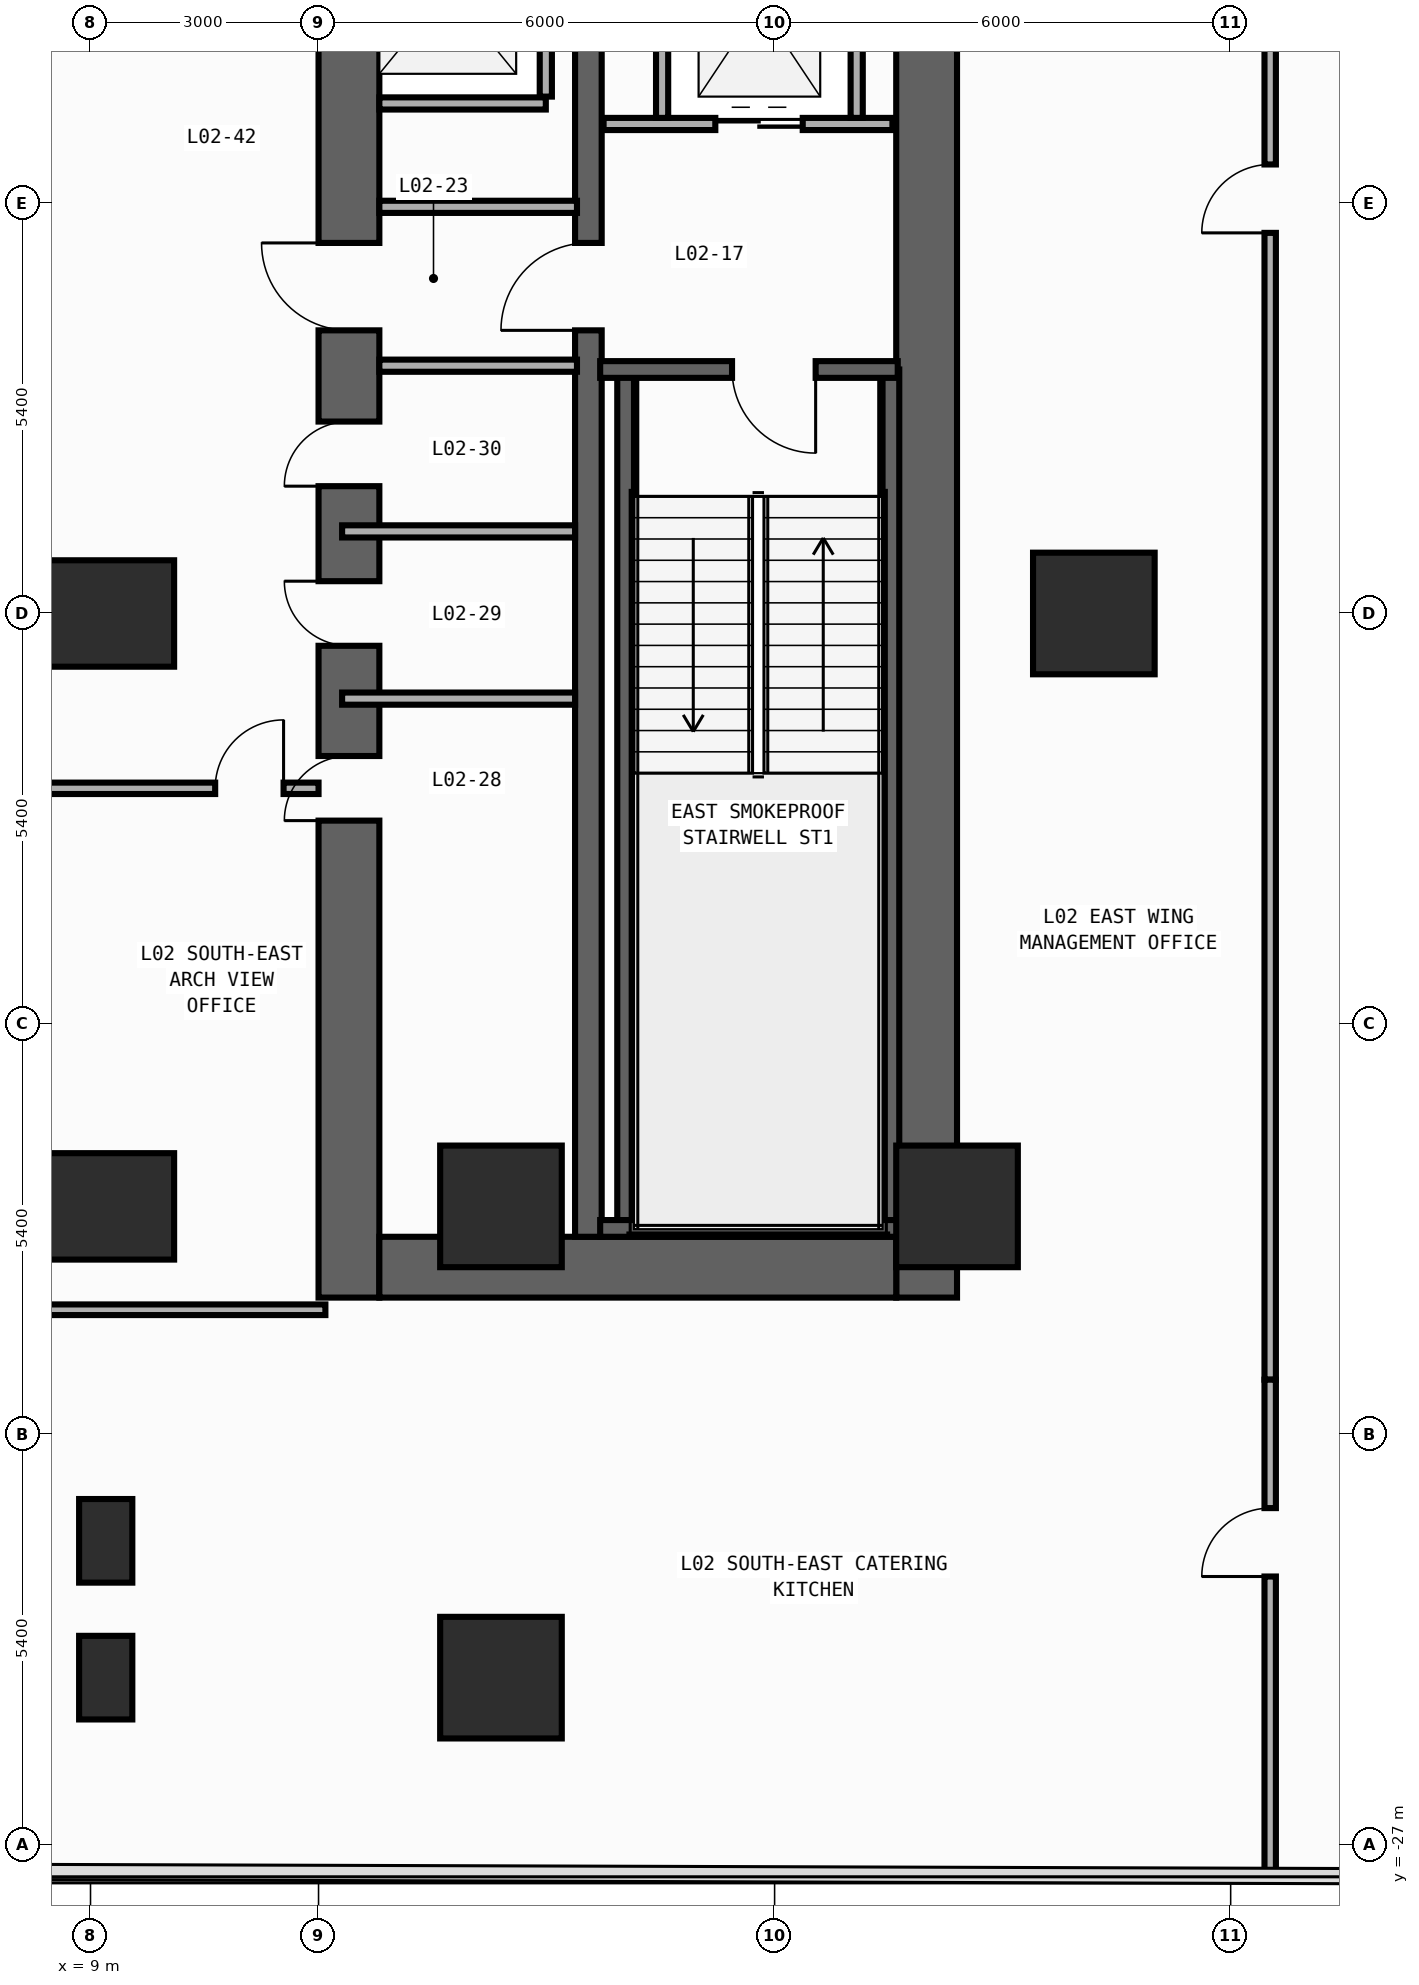
"""IFC4 building model, lengths in metres.
Left out: names, types, materials, properties, quantities, classifications, styles, units other than length and angle.
Written with IfcOpenShell. Run it as: python <this file> out.ifc"""

import sys

from ifc_helpers import new_model, si_unit, direction, frame, frame_2d, origin, origin_2d, place, context, subcontext, project, spatial, rectangle, extrude, element, fill, save


model = new_model("IFC4")
c1 = context("Model", 3, precision=1e-05, world=origin(), true_north=direction((0.0, 1.0)))
c2 = subcontext(c1, "Body", "Model", "MODEL_VIEW")
j1 = project(units=[si_unit("LENGTHUNIT", "METRE"), si_unit("PLANEANGLEUNIT", "RADIAN")], contexts=[c1])
p1 = place(None, origin())
s1 = spatial("IfcSite", under=j1, at=p1, CompositionType="ELEMENT")
p2 = place(p1, origin())
s2 = spatial("IfcBuilding", under=s1, at=p2, CompositionType="ELEMENT")
p3 = place(p2, frame((0.0, 0.0, 6.0)))
s3 = spatial("IfcBuildingStorey", under=s2, at=p3, CompositionType="ELEMENT", Elevation=6.0)
p4 = place(p3, frame((12.4, -19.8, 0.0), z_axis=(0.0, 0.0, 1.0), x_axis=(0.0, 1.0, 0.0)))
e1 = element("IfcWall", 1, at=p4, inside=s3, PredefinedType="SHEAR", context=c2, shape_type="SweptSolid", body=[
    extrude(rectangle(XDim=27.0, YDim=0.8, at=frame_2d((13.5, 0.0))), origin(), (0.0, 0.0, 1.0), 4.7),
])
p5 = place(p4, frame((23.05, 0.0, 0.0)))
e2 = element("IfcOpeningElement", 2, at=p5, cuts=e1, PredefinedType="OPENING", context=c2, shape_type="SweptSolid", body=[
    extrude(rectangle(XDim=1.1, YDim=2.2, at=frame_2d((0.55, 1.1))), frame((0.0, 0.41, 0.0), z_axis=(0.0, -1.0, 0.0), x_axis=(1.0, 0.0, 0.0)), (0.0, 0.0, 1.0), 0.82),
])
p6 = place(p4, frame((19.85, 0.0, 0.0)))
e3 = element("IfcOpeningElement", 3, at=p6, cuts=e1, PredefinedType="OPENING", context=c2, shape_type="SweptSolid", body=[
    extrude(rectangle(XDim=1.1, YDim=2.2, at=frame_2d((0.55, 1.1))), frame((0.0, 0.41, 0.0), z_axis=(0.0, -1.0, 0.0), x_axis=(1.0, 0.0, 0.0)), (0.0, 0.0, 1.0), 0.82),
])
p7 = place(p4, frame((16.65, 0.0, 0.0)))
e4 = element("IfcOpeningElement", 4, at=p7, cuts=e1, PredefinedType="OPENING", context=c2, shape_type="SweptSolid", body=[
    extrude(rectangle(XDim=1.1, YDim=2.2, at=frame_2d((0.55, 1.1))), frame((0.0, 0.41, 0.0), z_axis=(0.0, -1.0, 0.0), x_axis=(1.0, 0.0, 0.0)), (0.0, 0.0, 1.0), 0.82),
])
p8 = place(p4, frame((6.275, 0.0, 0.0)))
e5 = element("IfcOpeningElement", 5, at=p8, cuts=e1, PredefinedType="OPENING", context=c2, shape_type="SweptSolid", body=[
    extrude(rectangle(XDim=0.85, YDim=2.1, at=frame_2d((0.425, 1.05))), frame((0.0, 0.41, 0.0), z_axis=(0.0, -1.0, 0.0), x_axis=(1.0, 0.0, 0.0)), (0.0, 0.0, 1.0), 0.82),
])
p9 = place(p4, frame((8.575, 0.0, 0.0)))
e6 = element("IfcOpeningElement", 6, at=p9, cuts=e1, PredefinedType="OPENING", context=c2, shape_type="SweptSolid", body=[
    extrude(rectangle(XDim=0.85, YDim=2.1, at=frame_2d((0.425, 1.05))), frame((0.0, 0.41, 0.0), z_axis=(0.0, -1.0, 0.0), x_axis=(1.0, 0.0, 0.0)), (0.0, 0.0, 1.0), 0.82),
])
p10 = place(p4, frame((10.675, 0.0, 0.0)))
e7 = element("IfcOpeningElement", 7, at=p10, cuts=e1, PredefinedType="OPENING", context=c2, shape_type="SweptSolid", body=[
    extrude(rectangle(XDim=0.85, YDim=2.1, at=frame_2d((0.425, 1.05))), frame((0.0, 0.41, 0.0), z_axis=(0.0, -1.0, 0.0), x_axis=(1.0, 0.0, 0.0)), (0.0, 0.0, 1.0), 0.82),
])
p11 = place(p4, frame((12.725, 0.0, 0.0)))
e8 = element("IfcOpeningElement", 8, at=p11, cuts=e1, PredefinedType="OPENING", context=c2, shape_type="SweptSolid", body=[
    extrude(rectangle(XDim=1.15, YDim=2.2, at=frame_2d((0.575, 1.1))), frame((0.0, 0.41, 0.0), z_axis=(0.0, -1.0, 0.0), x_axis=(1.0, 0.0, 0.0)), (0.0, 0.0, 1.0), 0.82),
])
p12 = place(p4, frame((25.125, 0.0, 0.0)))
e9 = element("IfcOpeningElement", 9, at=p12, cuts=e1, PredefinedType="OPENING", context=c2, shape_type="SweptSolid", body=[
    extrude(rectangle(XDim=0.85, YDim=2.1, at=frame_2d((0.425, 1.05))), frame((0.0, 0.41, 0.0), z_axis=(0.0, -1.0, 0.0), x_axis=(1.0, 0.0, 0.0)), (0.0, 0.0, 1.0), 0.82),
])
p13 = place(p3, frame((20.0, -19.8, 0.0), z_axis=(0.0, 0.0, 1.0), x_axis=(0.0, 1.0, 0.0)))
e10 = element("IfcWall", 10, at=p13, inside=s3, PredefinedType="SHEAR", context=c2, shape_type="SweptSolid", body=[
    extrude(rectangle(XDim=27.0, YDim=0.8, at=frame_2d((13.5, 0.0))), origin(), (0.0, 0.0, 1.0), 4.7),
])
p14 = place(p3, frame((12.8, -19.4, 0.0), z_axis=(0.0, 0.0, 1.0), x_axis=(1.0, 0.0, 0.0)))
e11 = element("IfcWall", 11, at=p14, inside=s3, PredefinedType="SHEAR", context=c2, shape_type="SweptSolid", body=[
    extrude(rectangle(XDim=6.8, YDim=0.8, at=frame_2d((3.4, 0.0))), origin(), (0.0, 0.0, 1.0), 4.7),
])
p15 = place(p3, frame((15.55, -19.0, 0.0), z_axis=(0.0, 0.0, 1.0), x_axis=(0.0, 1.0, 0.0)))
e12 = element("IfcWall", 12, at=p15, inside=s3, PredefinedType="SHEAR", context=c2, shape_type="SweptSolid", body=[
    extrude(rectangle(XDim=25.4, YDim=0.35, at=frame_2d((12.7, 0.0))), origin(), (0.0, 0.0, 1.0), 4.7),
])
p16 = place(p15, frame((11.925, 0.0, 0.0)))
e13 = element("IfcOpeningElement", 13, at=p16, cuts=e12, PredefinedType="OPENING", context=c2, shape_type="SweptSolid", body=[
    extrude(rectangle(XDim=1.15, YDim=2.2, at=frame_2d((0.575, 1.1))), frame((0.0, 0.185, 0.0), z_axis=(0.0, -1.0, 0.0), x_axis=(1.0, 0.0, 0.0)), (0.0, 0.0, 1.0), 0.37),
])
p17 = place(p15, frame((24.325, 0.0, 0.0)))
e14 = element("IfcOpeningElement", 14, at=p17, cuts=e12, PredefinedType="OPENING", context=c2, shape_type="SweptSolid", body=[
    extrude(rectangle(XDim=0.85, YDim=2.1, at=frame_2d((0.425, 1.05))), frame((0.0, 0.185, 0.0), z_axis=(0.0, -1.0, 0.0), x_axis=(1.0, 0.0, 0.0)), (0.0, 0.0, 1.0), 0.37),
])
for number, where, z_axis, x_axis in (
    (15, (16.04, -18.89, 0.0), (0.0, 0.0, 1.0), (0.0, 1.0, 0.0)),
    (16, (19.53, -18.89, 0.0), (0.0, 0.0, 1.0), (0.0, 1.0, 0.0)),
):
    element("IfcWall", number, at=place(p3, frame(where, z_axis=z_axis, x_axis=x_axis)), inside=s3, PredefinedType="SHEAR", context=c2, shape_type="SweptSolid", body=[
        extrude(rectangle(XDim=11.3, YDim=0.22, at=frame_2d((5.65, 0.0))), origin(), (0.0, 0.0, 1.0), 4.7),
    ])
p18 = place(p3, frame((15.705, -18.89, 0.0), z_axis=(0.0, 0.0, 1.0), x_axis=(1.0, 0.0, 0.0)))
e17 = element("IfcWall", 17, at=p18, inside=s3, PredefinedType="SHEAR", context=c2, shape_type="SweptSolid", body=[
    extrude(rectangle(XDim=3.915, YDim=0.22, at=frame_2d((1.958, 0.0))), origin(), (0.0, 0.0, 1.0), 4.7),
])
p19 = place(p3, frame((19.62, -7.59, 0.0), z_axis=(0.0, 0.0, 1.0), x_axis=(-1.0, 0.0, 0.0)))
e18 = element("IfcWall", 18, at=p19, inside=s3, PredefinedType="SHEAR", context=c2, shape_type="SweptSolid", body=[
    extrude(rectangle(XDim=3.915, YDim=0.22, at=frame_2d((1.958, 0.0))), origin(), (0.0, 0.0, 1.0), 4.7),
])
p20 = place(p19, frame((1.08, 0.0, 0.0)))
e19 = element("IfcOpeningElement", 19, at=p20, cuts=e18, PredefinedType="OPENING", context=c2, shape_type="SweptSolid", body=[
    extrude(rectangle(XDim=1.1, YDim=2.2, at=frame_2d((0.55, 1.1))), frame((0.0, 0.12, 0.0), z_axis=(0.0, -1.0, 0.0), x_axis=(1.0, 0.0, 0.0)), (0.0, 0.0, 1.0), 0.24),
])
for number, where, z_axis, x_axis in (
    (20, (9.2, -18.6, 0.0), (0.0, 0.0, 1.0), (1.0, 0.0, 0.0)),
    (21, (9.2, -10.8, 0.0), (0.0, 0.0, 1.0), (1.0, 0.0, 0.0)),
):
    element("IfcColumn", number, at=place(p3, frame(where, z_axis=z_axis, x_axis=x_axis)), inside=s3, PredefinedType="COLUMN", context=c2, shape_type="SweptSolid", body=[
        extrude(rectangle(XDim=1.8, YDim=1.4, at=origin_2d()), origin(), (0.0, 0.0, 1.0), 5.0),
    ])
for number, where, z_axis, x_axis in (
    (22, (20.4, -18.6, 0.0), (0.0, 0.0, 1.0), (1.0, 0.0, 0.0)),
    (23, (14.4, -18.6, 0.0), (0.0, 0.0, 1.0), (1.0, 0.0, 0.0)),
):
    element("IfcColumn", number, at=place(p3, frame(where, z_axis=z_axis, x_axis=x_axis)), inside=s3, PredefinedType="COLUMN", context=c2, shape_type="SweptSolid", body=[
        extrude(rectangle(XDim=1.6, YDim=1.6, at=origin_2d()), origin(), (0.0, 0.0, 1.0), 5.0),
    ])
p21 = place(p3, frame((9.2, -24.8, 0.0), z_axis=(0.0, 0.0, 1.0), x_axis=(1.0, 0.0, 0.0)))
e24 = element("IfcColumn", 24, at=p21, inside=s3, PredefinedType="PILASTER", context=c2, shape_type="SweptSolid", body=[
    extrude(rectangle(XDim=0.7, YDim=1.1, at=origin_2d()), origin(), (0.0, 0.0, 1.0), 5.0),
])
for number, where, z_axis, x_axis in (
    (25, (22.2, -10.8, 0.0), (0.0, 0.0, 1.0), (1.0, 0.0, 0.0)),
    (26, (14.4, -24.8, 0.0), (0.0, 0.0, 1.0), (1.0, 0.0, 0.0)),
):
    element("IfcColumn", number, at=place(p3, frame(where, z_axis=z_axis, x_axis=x_axis)), inside=s3, PredefinedType="COLUMN", context=c2, shape_type="SweptSolid", body=[
        extrude(rectangle(XDim=1.6, YDim=1.6, at=origin_2d()), origin(), (0.0, 0.0, 1.0), 5.0),
    ])
p22 = place(p3, frame((9.2, -23.0, 0.0), z_axis=(0.0, 0.0, 1.0), x_axis=(1.0, 0.0, 0.0)))
e27 = element("IfcColumn", 27, at=p22, inside=s3, PredefinedType="PILASTER", context=c2, shape_type="SweptSolid", body=[
    extrude(rectangle(XDim=0.7, YDim=1.1, at=origin_2d()), origin(), (0.0, 0.0, 1.0), 5.0),
])
p23 = place(p3, frame((12.8, -4.09, 0.0), z_axis=(0.0, 0.0, 1.0), x_axis=(1.0, 0.0, 0.0)))
e28 = element("IfcWall", 28, at=p23, inside=s3, PredefinedType="STANDARD", context=c2, shape_type="SweptSolid", body=[
    extrude(rectangle(XDim=2.19, YDim=0.16, at=frame_2d((1.095, 0.0))), origin(), (0.0, 0.0, 1.0), 4.7),
])
p24 = place(p3, frame((14.99, -4.0, 0.0), z_axis=(0.0, 0.0, 1.0), x_axis=(0.0, 1.0, 0.0)))
e29 = element("IfcWall", 29, at=p24, inside=s3, PredefinedType="STANDARD", context=c2, shape_type="SweptSolid", body=[
    extrude(rectangle(XDim=2.8, YDim=0.16, at=frame_2d((1.4, 0.0))), origin(), (0.0, 0.0, 1.0), 4.7),
])
p25 = place(p3, frame((15.75, -4.36, 0.0), z_axis=(0.0, 0.0, 1.0), x_axis=(1.0, 0.0, 0.0)))
e30 = element("IfcWall", 30, at=p25, inside=s3, PredefinedType="STANDARD", context=c2, shape_type="SweptSolid", body=[
    extrude(rectangle(XDim=3.8, YDim=0.16, at=frame_2d((1.9, 0.0))), origin(), (0.0, 0.0, 1.0), 4.7),
])
p26 = place(p25, frame((1.47, 0.0, 0.0)))
e31 = element("IfcOpeningElement", 31, at=p26, cuts=e30, PredefinedType="OPENING", context=c2, shape_type="SweptSolid", body=[
    extrude(rectangle(XDim=1.15, YDim=2.2, at=frame_2d((0.575, 1.1))), frame((0.0, 0.09, 0.0), z_axis=(0.0, -1.0, 0.0), x_axis=(1.0, 0.0, 0.0)), (0.0, 0.0, 1.0), 0.18),
])
for number, where, z_axis, x_axis in (
    (32, (16.52, -4.28, 0.0), (0.0, 0.0, 1.0), (0.0, 1.0, 0.0)),
    (33, (19.08, -4.28, 0.0), (0.0, 0.0, 1.0), (0.0, 1.0, 0.0)),
):
    element("IfcWall", number, at=place(p3, frame(where, z_axis=z_axis, x_axis=x_axis)), inside=s3, PredefinedType="STANDARD", context=c2, shape_type="SweptSolid", body=[
        extrude(rectangle(XDim=2.98, YDim=0.16, at=frame_2d((1.49, 0.0))), origin(), (0.0, 0.0, 1.0), 4.7),
    ])
for number, where, z_axis, x_axis in (
    (34, (12.8, -5.45, 0.0), (0.0, 0.0, 1.0), (1.0, 0.0, 0.0)),
    (35, (12.8, -7.54, 0.0), (0.0, 0.0, 1.0), (1.0, 0.0, 0.0)),
):
    element("IfcWall", number, at=place(p3, frame(where, z_axis=z_axis, x_axis=x_axis)), inside=s3, PredefinedType="STANDARD", context=c2, shape_type="SweptSolid", body=[
        extrude(rectangle(XDim=2.6, YDim=0.16, at=frame_2d((1.3, 0.0))), origin(), (0.0, 0.0, 1.0), 4.7),
    ])
for number, where, z_axis, x_axis in (
    (36, (12.31, -11.92, 0.0), (0.0, 0.0, 1.0), (1.0, 0.0, 0.0)),
    (37, (12.31, -9.72, 0.0), (0.0, 0.0, 1.0), (1.0, 0.0, 0.0)),
):
    element("IfcWall", number, at=place(p3, frame(where, z_axis=z_axis, x_axis=x_axis)), inside=s3, PredefinedType="PARTITIONING", context=c2, shape_type="SweptSolid", body=[
        extrude(rectangle(XDim=3.065, YDim=0.16, at=frame_2d((1.532, 0.0))), origin(), (0.0, 0.0, 1.0), 4.7),
    ])
p27 = place(p3, frame((8.205, -13.1, 0.0), z_axis=(0.0, 0.0, 1.0), x_axis=(1.0, 0.0, 0.0)))
e38 = element("IfcWall", 38, at=p27, inside=s3, PredefinedType="PARTITIONING", context=c2, shape_type="SweptSolid", body=[
    extrude(rectangle(XDim=3.795, YDim=0.15, at=frame_2d((1.897, 0.0))), origin(), (0.0, 0.0, 1.0), 4.7),
])
p28 = place(p27, frame((2.435, 0.0, 0.0)))
e39 = element("IfcOpeningElement", 39, at=p28, cuts=e38, PredefinedType="OPENING", context=c2, shape_type="SweptSolid", body=[
    extrude(rectangle(XDim=0.9, YDim=2.15, at=frame_2d((0.45, 1.075))), frame((0.0, 0.085, 0.0), z_axis=(0.0, -1.0, 0.0), x_axis=(1.0, 0.0, 0.0)), (0.0, 0.0, 1.0), 0.17),
])
p29 = place(p3, frame((24.52, -20.88, 0.0), z_axis=(0.0, 0.0, 1.0), x_axis=(0.0, 1.0, 0.0)))
e40 = element("IfcWall", 40, at=p29, inside=s3, PredefinedType="PARTITIONING", context=c2, shape_type="SweptSolid", body=[
    extrude(rectangle(XDim=31.275, YDim=0.15, at=frame_2d((15.637, 0.0))), origin(), (0.0, 0.0, 1.0), 4.7),
])
p30 = place(p29, frame((15.087, 0.0, 0.0)))
e41 = element("IfcOpeningElement", 41, at=p30, cuts=e40, PredefinedType="OPENING", context=c2, shape_type="SweptSolid", body=[
    extrude(rectangle(XDim=0.9, YDim=2.15, at=frame_2d((0.45, 1.075))), frame((0.0, 0.085, 0.0), z_axis=(0.0, -1.0, 0.0), x_axis=(1.0, 0.0, 0.0)), (0.0, 0.0, 1.0), 0.17),
])
p31 = place(p3, frame((24.52, -27.413, 0.0), z_axis=(0.0, 0.0, 1.0), x_axis=(0.0, 1.0, 0.0)))
e42 = element("IfcWall", 42, at=p31, inside=s3, PredefinedType="PARTITIONING", context=c2, shape_type="SweptSolid", body=[
    extrude(rectangle(XDim=6.533, YDim=0.15, at=frame_2d((3.266, 0.0))), origin(), (0.0, 0.0, 1.0), 4.7),
])
p32 = place(p31, frame((3.943, 0.0, 0.0)))
e43 = element("IfcOpeningElement", 43, at=p32, cuts=e42, PredefinedType="OPENING", context=c2, shape_type="SweptSolid", body=[
    extrude(rectangle(XDim=0.9, YDim=2.15, at=frame_2d((0.45, 1.075))), frame((0.0, 0.085, 0.0), z_axis=(0.0, -1.0, 0.0), x_axis=(1.0, 0.0, 0.0)), (0.0, 0.0, 1.0), 0.17),
])
p33 = place(p3, frame((8.205, -19.96, 0.0), z_axis=(0.0, 0.0, 1.0), x_axis=(1.0, 0.0, 0.0)))
e44 = element("IfcWall", 44, at=p33, inside=s3, PredefinedType="PARTITIONING", context=c2, shape_type="SweptSolid", body=[
    extrude(rectangle(XDim=3.885, YDim=0.14, at=frame_2d((1.942, 0.0))), origin(), (0.0, 0.0, 1.0), 4.7),
])
p34 = place(p20, origin())
e45 = element("IfcDoor", 45, at=p34, inside=s3, OperationType="SINGLE_SWING_LEFT", PredefinedType="DOOR", context=c2, shape_type="SweptSolid", body=[
    extrude(rectangle(XDim=1.1, YDim=2.2, at=frame_2d((0.55, 1.1))), frame((0.0, 0.025, 0.0), z_axis=(0.0, -1.0, 0.0), x_axis=(1.0, 0.0, 0.0)), (0.0, 0.0, 1.0), 0.05),
])
fill(e19, e45)
p35 = place(p8, origin())
e46 = element("IfcDoor", 46, at=p35, inside=s3, OperationType="SINGLE_SWING_LEFT", PredefinedType="DOOR", context=c2, shape_type="SweptSolid", body=[
    extrude(rectangle(XDim=0.85, YDim=2.1, at=frame_2d((0.425, 1.05))), frame((0.0, 0.025, 0.0), z_axis=(0.0, -1.0, 0.0), x_axis=(1.0, 0.0, 0.0)), (0.0, 0.0, 1.0), 0.05),
])
fill(e5, e46)
p36 = place(p9, origin())
e47 = element("IfcDoor", 47, at=p36, inside=s3, OperationType="SINGLE_SWING_RIGHT", PredefinedType="DOOR", context=c2, shape_type="SweptSolid", body=[
    extrude(rectangle(XDim=0.85, YDim=2.1, at=frame_2d((0.425, 1.05))), frame((0.0, 0.025, 0.0), z_axis=(0.0, -1.0, 0.0), x_axis=(1.0, 0.0, 0.0)), (0.0, 0.0, 1.0), 0.05),
])
fill(e6, e47)
p37 = place(p10, origin())
e48 = element("IfcDoor", 48, at=p37, inside=s3, OperationType="SINGLE_SWING_LEFT", PredefinedType="DOOR", context=c2, shape_type="SweptSolid", body=[
    extrude(rectangle(XDim=0.85, YDim=2.1, at=frame_2d((0.425, 1.05))), frame((0.0, 0.025, 0.0), z_axis=(0.0, -1.0, 0.0), x_axis=(1.0, 0.0, 0.0)), (0.0, 0.0, 1.0), 0.05),
])
fill(e7, e48)
p38 = place(p11, origin())
e49 = element("IfcDoor", 49, at=p38, inside=s3, OperationType="SINGLE_SWING_RIGHT", PredefinedType="DOOR", context=c2, shape_type="SweptSolid", body=[
    extrude(rectangle(XDim=1.15, YDim=2.2, at=frame_2d((0.575, 1.1))), frame((0.0, 0.025, 0.0), z_axis=(0.0, -1.0, 0.0), x_axis=(1.0, 0.0, 0.0)), (0.0, 0.0, 1.0), 0.05),
])
fill(e8, e49)
p39 = place(p16, origin())
e50 = element("IfcDoor", 50, at=p39, inside=s3, OperationType="SINGLE_SWING_LEFT", PredefinedType="DOOR", context=c2, shape_type="SweptSolid", body=[
    extrude(rectangle(XDim=1.15, YDim=2.2, at=frame_2d((0.575, 1.1))), frame((0.0, 0.025, 0.0), z_axis=(0.0, -1.0, 0.0), x_axis=(1.0, 0.0, 0.0)), (0.0, 0.0, 1.0), 0.05),
])
fill(e13, e50)
p40 = place(p26, origin())
e51 = element("IfcDoor", 51, at=p40, inside=s3, OperationType="DOUBLE_DOOR_SLIDING", PredefinedType="DOOR", context=c2, shape_type="SweptSolid", body=[
    extrude(rectangle(XDim=1.15, YDim=2.2, at=frame_2d((0.575, 1.1))), frame((0.0, 0.025, 0.0), z_axis=(0.0, -1.0, 0.0), x_axis=(1.0, 0.0, 0.0)), (0.0, 0.0, 1.0), 0.05),
])
fill(e31, e51)
p41 = place(p28, origin())
e52 = element("IfcDoor", 52, at=p41, inside=s3, OperationType="SINGLE_SWING_RIGHT", PredefinedType="DOOR", context=c2, shape_type="SweptSolid", body=[
    extrude(rectangle(XDim=0.9, YDim=2.15, at=frame_2d((0.45, 1.075))), frame((0.0, 0.025, 0.0), z_axis=(0.0, -1.0, 0.0), x_axis=(1.0, 0.0, 0.0)), (0.0, 0.0, 1.0), 0.05),
])
fill(e39, e52)
p42 = place(p30, origin())
e53 = element("IfcDoor", 53, at=p42, inside=s3, OperationType="SINGLE_SWING_LEFT", PredefinedType="DOOR", context=c2, shape_type="SweptSolid", body=[
    extrude(rectangle(XDim=0.9, YDim=2.15, at=frame_2d((0.45, 1.075))), frame((0.0, 0.025, 0.0), z_axis=(0.0, -1.0, 0.0), x_axis=(1.0, 0.0, 0.0)), (0.0, 0.0, 1.0), 0.05),
])
fill(e41, e53)
p43 = place(p32, origin())
e54 = element("IfcDoor", 54, at=p43, inside=s3, OperationType="SINGLE_SWING_LEFT", PredefinedType="DOOR", context=c2, shape_type="SweptSolid", body=[
    extrude(rectangle(XDim=0.9, YDim=2.15, at=frame_2d((0.45, 1.075))), frame((0.0, 0.025, 0.0), z_axis=(0.0, -1.0, 0.0), x_axis=(1.0, 0.0, 0.0)), (0.0, 0.0, 1.0), 0.05),
])
fill(e43, e54)
save(model, sys.argv[1])
